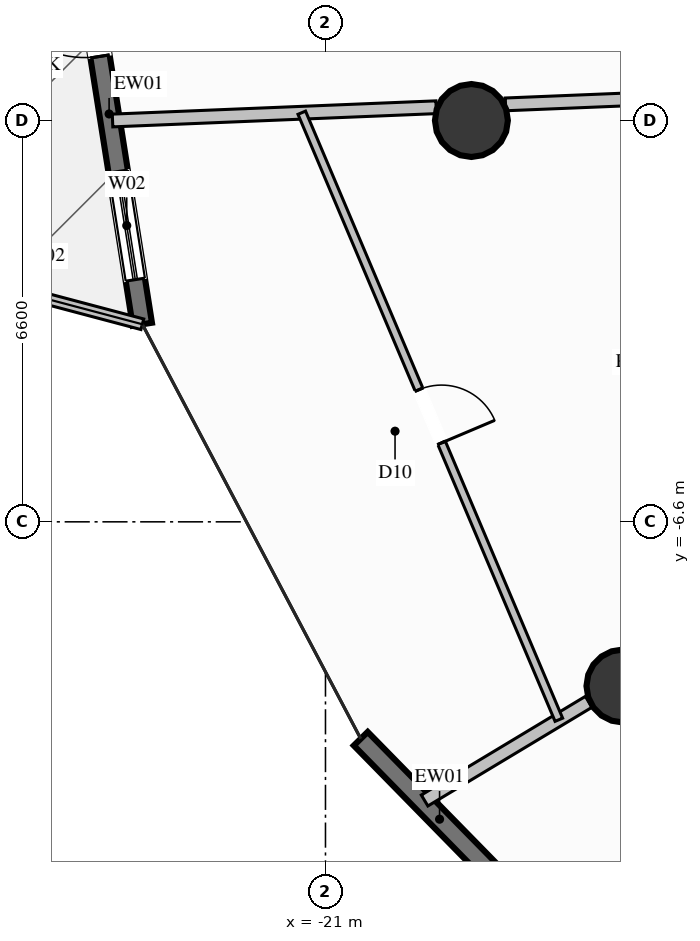
"""IFC4 building model, lengths in metres.
Left out: names, types, materials, properties, quantities, classifications, styles, units other than length and angle.
Written with IfcOpenShell. Run it as: python <this file> out.ifc"""

import sys

from ifc_helpers import new_model, si_unit, direction, frame, frame_2d, origin, origin_2d, place, context, subcontext, project, spatial, rectangle, circle, extrude, element, fill, save


model = new_model("IFC4")
c1 = context("Model", 3, precision=1e-05, world=origin(), true_north=direction((0.0, 1.0)))
c2 = subcontext(c1, "Body", "Model", "MODEL_VIEW")
j1 = project(units=[si_unit("LENGTHUNIT", "METRE"), si_unit("PLANEANGLEUNIT", "RADIAN")], contexts=[c1])
p1 = place(None, origin())
s1 = spatial("IfcSite", under=j1, at=p1, CompositionType="ELEMENT")
p2 = place(p1, origin())
s2 = spatial("IfcBuilding", under=s1, at=p2, CompositionType="ELEMENT")
p3 = place(p2, frame((0.0, 0.0, 82.4)))
s3 = spatial("IfcBuildingStorey", under=s2, at=p3, CompositionType="ELEMENT", Elevation=82.4)
for number, where, z_axis, x_axis in (
    (1, (-18.6, 0.0, 0.0), (0.0, 0.0, 1.0), (1.0, 0.0, 0.0)),
    (2, (-16.108, -9.3, 0.0), (0.0, 0.0, 1.0), (1.0, 0.0, 0.0)),
):
    element("IfcColumn", number, at=place(p3, frame(where, z_axis=z_axis, x_axis=x_axis)), inside=s3, PredefinedType="COLUMN", context=c2, shape_type="SweptSolid", body=[
        extrude(circle(Radius=0.6, at=origin_2d()), origin(), (0.0, 0.0, 1.0), 3.6),
    ])
p4 = place(p3, frame((-24.012, -3.351, 0.0), z_axis=(0.0, 0.0, 1.0), x_axis=(-0.156096023317, 0.987741885061, 0.0)))
e3 = element("IfcWall", 3, at=p4, inside=s3, PredefinedType="SOLIDWALL", context=c2, shape_type="SweptSolid", body=[
    extrude(rectangle(XDim=7.234, YDim=0.32, at=frame_2d((3.617, 0.0))), origin(), (0.0, 0.0, 1.0), 3.34),
])
p5 = place(p4, frame((0.743, 0.0, 0.35)))
e4 = element("IfcOpeningElement", 4, at=p5, cuts=e3, PredefinedType="OPENING", context=c2, shape_type="SweptSolid", body=[
    extrude(rectangle(XDim=1.8, YDim=2.6, at=frame_2d((0.9, 1.3))), frame((0.0, 0.17, 0.0), z_axis=(0.0, -1.0, 0.0), x_axis=(1.0, 0.0, 0.0)), (0.0, 0.0, 1.0), 0.34),
])
p6 = place(p4, frame((4.46, 0.0, 0.0)))
e5 = element("IfcOpeningElement", 5, at=p6, cuts=e3, PredefinedType="OPENING", context=c2, shape_type="SweptSolid", body=[
    extrude(rectangle(XDim=1.6, YDim=2.3, at=frame_2d((0.8, 1.15))), frame((0.0, 0.17, 0.0), z_axis=(0.0, -1.0, 0.0), x_axis=(1.0, 0.0, 0.0)), (0.0, 0.0, 1.0), 0.34),
])
p7 = place(p3, frame((-14.717, -15.989, 0.0), z_axis=(0.0, 0.0, 1.0), x_axis=(-0.699759555634, 0.714378446132, 0.0)))
e6 = element("IfcWall", 6, at=p7, inside=s3, PredefinedType="SOLIDWALL", context=c2, shape_type="SweptSolid", body=[
    extrude(rectangle(XDim=8.15, YDim=0.32, at=frame_2d((4.075, 0.0))), origin(), (0.0, 0.0, 1.0), 3.34),
])
p8 = place(p7, frame((2.395, 0.0, 0.35)))
e7 = element("IfcOpeningElement", 7, at=p8, cuts=e6, PredefinedType="OPENING", context=c2, shape_type="SweptSolid", body=[
    extrude(rectangle(XDim=1.8, YDim=2.6, at=frame_2d((0.9, 1.3))), frame((0.0, 0.17, 0.0), z_axis=(0.0, -1.0, 0.0), x_axis=(1.0, 0.0, 0.0)), (0.0, 0.0, 1.0), 0.34),
])
p9 = place(p3, frame((-27.241, -2.494, 0.0), z_axis=(0.0, 0.0, 1.0), x_axis=(0.966524212646, -0.25657542043, 0.0)))
e8 = element("IfcWall", 8, at=p9, inside=s3, PredefinedType="PARAPET", context=c2, shape_type="SweptSolid", body=[
    extrude(rectangle(XDim=3.341, YDim=0.18, at=frame_2d((1.67, 0.0))), origin(), (0.0, 0.0, 1.0), 1.12),
])
p10 = place(p3, frame((-12.3, 0.5, 0.0), z_axis=(0.0, 0.0, 1.0), x_axis=(-0.999161926823, -0.040932187669, 0.0)))
e9 = element("IfcWall", 9, at=p10, inside=s3, PredefinedType="PARTITIONING", context=c2, shape_type="SweptSolid", body=[
    extrude(rectangle(XDim=5.744, YDim=0.21, at=frame_2d((2.872, 0.0))), origin(), (0.0, 0.0, 1.0), 3.34),
])
p11 = place(p10, frame((0.959, 0.0, 0.0)))
e10 = element("IfcOpeningElement", 10, at=p11, cuts=e9, PredefinedType="OPENING", context=c2, shape_type="SweptSolid", body=[
    extrude(rectangle(XDim=0.95, YDim=2.1, at=frame_2d((0.475, 1.05))), frame((0.0, 0.115, 0.0), z_axis=(0.0, -1.0, 0.0), x_axis=(1.0, 0.0, 0.0)), (0.0, 0.0, 1.0), 0.23),
])
p12 = place(p3, frame((-19.18, 0.218, 0.0), z_axis=(0.0, 0.0, 1.0), x_axis=(-0.999161981527, -0.04093085231, 0.0)))
e11 = element("IfcWall", 11, at=p12, inside=s3, PredefinedType="PARTITIONING", context=c2, shape_type="SweptSolid", body=[
    extrude(rectangle(XDim=5.326, YDim=0.21, at=frame_2d((2.663, 0.0))), origin(), (0.0, 0.0, 1.0), 3.34),
])
p13 = place(p3, frame((-16.671, -9.56, 0.0), z_axis=(0.0, 0.0, 1.0), x_axis=(-0.857000088, -0.515316261308, 0.0)))
e12 = element("IfcWall", 12, at=p13, inside=s3, PredefinedType="PARTITIONING", context=c2, shape_type="SweptSolid", body=[
    extrude(rectangle(XDim=3.15, YDim=0.21, at=frame_2d((1.575, 0.0))), origin(), (0.0, 0.0, 1.0), 3.34),
])
p14 = place(p3, frame((-21.39, 0.128, 0.0), z_axis=(0.0, 0.0, 1.0), x_axis=(0.389972023746, -0.920826705029, 0.0)))
e13 = element("IfcWall", 13, at=p14, inside=s3, PredefinedType="PARTITIONING", context=c2, shape_type="SweptSolid", body=[
    extrude(rectangle(XDim=10.841, YDim=0.135, at=frame_2d((5.421, 0.0))), origin(), (0.0, 0.0, 1.0), 3.34),
])
p15 = place(p14, frame((4.946, 0.0, 0.0)))
e14 = element("IfcOpeningElement", 14, at=p15, cuts=e13, PredefinedType="OPENING", context=c2, shape_type="SweptSolid", body=[
    extrude(rectangle(XDim=0.95, YDim=2.1, at=frame_2d((0.475, 1.05))), frame((0.0, 0.078, 0.0), z_axis=(0.0, -1.0, 0.0), x_axis=(1.0, 0.0, 0.0)), (0.0, 0.0, 1.0), 0.155),
])
p16 = place(p5, origin())
e15 = element("IfcWindow", 15, at=p16, inside=s3, PartitioningType="SINGLE_PANEL", PredefinedType="WINDOW", context=c2, shape_type="SweptSolid", body=[
    extrude(rectangle(XDim=1.8, YDim=2.6, at=frame_2d((0.9, 1.3))), frame((0.0, 0.03, 0.0), z_axis=(0.0, -1.0, 0.0), x_axis=(1.0, 0.0, 0.0)), (0.0, 0.0, 1.0), 0.06),
])
fill(e4, e15)
p17 = place(p6, origin())
e16 = element("IfcDoor", 16, at=p17, inside=s3, OperationType="SINGLE_SWING_RIGHT", PredefinedType="DOOR", context=c2, shape_type="SweptSolid", body=[
    extrude(rectangle(XDim=1.6, YDim=2.3, at=frame_2d((0.8, 1.15))), frame((0.0, 0.025, 0.0), z_axis=(0.0, -1.0, 0.0), x_axis=(1.0, 0.0, 0.0)), (0.0, 0.0, 1.0), 0.05),
])
fill(e5, e16)
p18 = place(p15, origin())
e17 = element("IfcDoor", 17, at=p18, inside=s3, OperationType="SINGLE_SWING_RIGHT", PredefinedType="DOOR", context=c2, shape_type="SweptSolid", body=[
    extrude(rectangle(XDim=0.95, YDim=2.1, at=frame_2d((0.475, 1.05))), frame((0.0, 0.025, 0.0), z_axis=(0.0, -1.0, 0.0), x_axis=(1.0, 0.0, 0.0)), (0.0, 0.0, 1.0), 0.05),
])
fill(e14, e17)
save(model, sys.argv[1])
